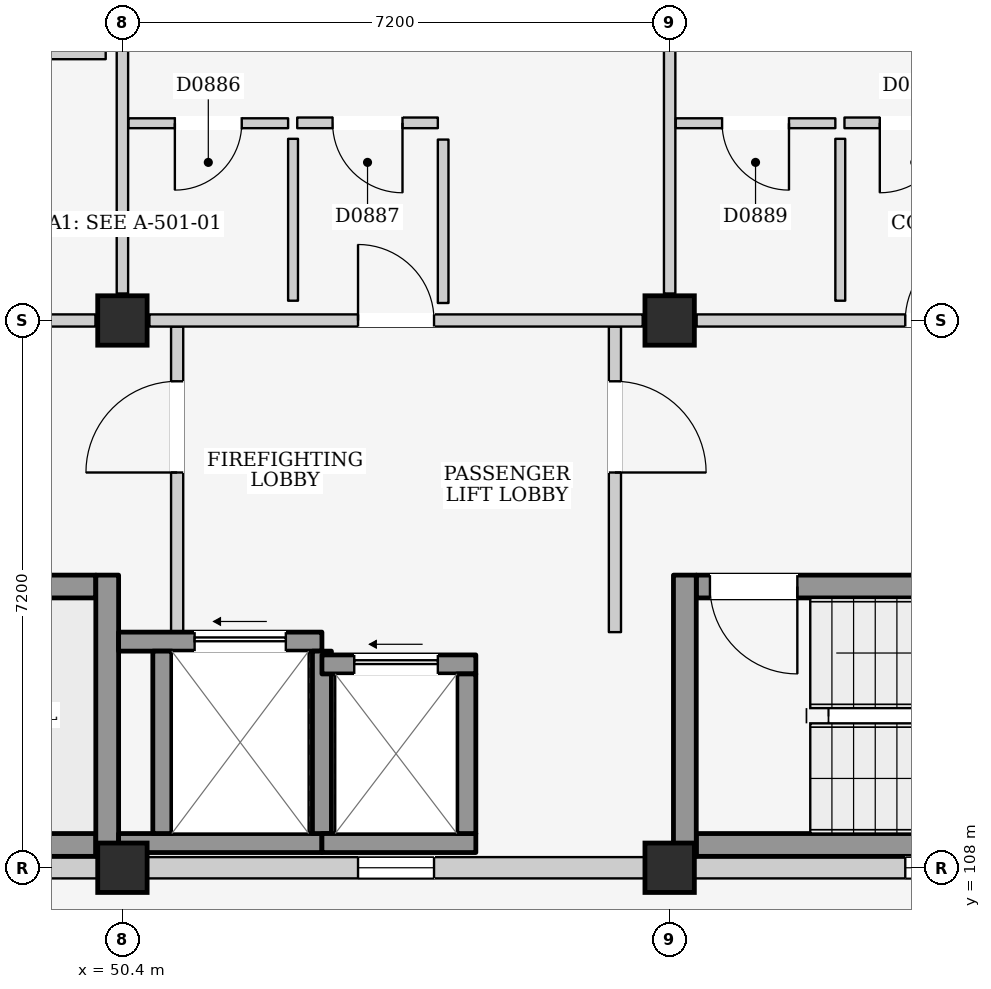
"""IFC4 building model, lengths in metres.
Left out: names, types, materials, properties, quantities, classifications, styles, units other than length and angle.
Written with IfcOpenShell. Run it as: python <this file> out.ifc"""

import sys

from ifc_helpers import new_model, si_unit, direction, frame, frame_2d, origin, origin_2d, place, context, subcontext, project, spatial, rectangle, extrude, element, fill, save


model = new_model("IFC4")
c1 = context("Model", 3, precision=1e-05, world=origin(), true_north=direction((0.0, 1.0)))
c2 = subcontext(c1, "Body", "Model", "MODEL_VIEW")
j1 = project(units=[si_unit("LENGTHUNIT", "METRE"), si_unit("PLANEANGLEUNIT", "RADIAN")], contexts=[c1])
p1 = place(None, origin())
s1 = spatial("IfcSite", under=j1, at=p1, CompositionType="ELEMENT")
p2 = place(p1, origin())
s2 = spatial("IfcBuilding", under=s1, at=p2, CompositionType="ELEMENT")
p3 = place(p2, frame((0.0, 0.0, 12.2)))
s3 = spatial("IfcBuildingStorey", under=s2, at=p3, CompositionType="ELEMENT", Elevation=12.2)
for number, where, z_axis, x_axis in (
    (1, (50.4, 108.0, 0.0), (0.0, 0.0, 1.0), (1.0, 0.0, 0.0)),
    (2, (50.4, 115.2, 0.0), (0.0, 0.0, 1.0), (1.0, 0.0, 0.0)),
    (3, (57.6, 108.0, 0.0), (0.0, 0.0, 1.0), (1.0, 0.0, 0.0)),
    (4, (57.6, 115.2, 0.0), (0.0, 0.0, 1.0), (1.0, 0.0, 0.0)),
):
    element("IfcColumn", number, at=place(p3, frame(where, z_axis=z_axis, x_axis=x_axis)), inside=s3, PredefinedType="COLUMN", context=c2, shape_type="SweptSolid", body=[
        extrude(rectangle(XDim=0.65, YDim=0.65, at=origin_2d()), origin(), (0.0, 0.0, 1.0), 3.2),
    ])
p4 = place(p3, frame((43.525, 108.0, 0.0), z_axis=(0.0, 0.0, 1.0), x_axis=(1.0, 0.0, 0.0)))
e5 = element("IfcWall", 5, at=p4, inside=s3, PredefinedType="ELEMENTEDWALL", context=c2, shape_type="SweptSolid", body=[
    extrude(rectangle(XDim=6.55, YDim=0.28, at=frame_2d((3.275, 0.0))), origin(), (0.0, 0.0, 1.0), 2.315),
])
p5 = place(p4, frame((2.775, 0.0, 1.2)))
e6 = element("IfcOpeningElement", 6, at=p5, cuts=e5, PredefinedType="OPENING", context=c2, shape_type="SweptSolid", body=[
    extrude(rectangle(XDim=1.0, YDim=0.9, at=frame_2d((0.5, 0.45))), frame((0.0, 0.155, 0.0), z_axis=(0.0, -1.0, 0.0), x_axis=(1.0, 0.0, 0.0)), (0.0, 0.0, 1.0), 0.31),
])
p6 = place(p3, frame((50.725, 108.0, 0.0), z_axis=(0.0, 0.0, 1.0), x_axis=(1.0, 0.0, 0.0)))
e7 = element("IfcWall", 7, at=p6, inside=s3, PredefinedType="ELEMENTEDWALL", context=c2, shape_type="SweptSolid", body=[
    extrude(rectangle(XDim=6.55, YDim=0.28, at=frame_2d((3.275, 0.0))), origin(), (0.0, 0.0, 1.0), 2.315),
])
p7 = place(p6, frame((2.775, 0.0, 1.2)))
e8 = element("IfcOpeningElement", 8, at=p7, cuts=e7, PredefinedType="OPENING", context=c2, shape_type="SweptSolid", body=[
    extrude(rectangle(XDim=1.0, YDim=0.9, at=frame_2d((0.5, 0.45))), frame((0.0, 0.155, 0.0), z_axis=(0.0, -1.0, 0.0), x_axis=(1.0, 0.0, 0.0)), (0.0, 0.0, 1.0), 0.31),
])
p8 = place(p3, frame((57.925, 108.0, 0.0), z_axis=(0.0, 0.0, 1.0), x_axis=(1.0, 0.0, 0.0)))
e9 = element("IfcWall", 9, at=p8, inside=s3, PredefinedType="ELEMENTEDWALL", context=c2, shape_type="SweptSolid", body=[
    extrude(rectangle(XDim=6.55, YDim=0.28, at=frame_2d((3.275, 0.0))), origin(), (0.0, 0.0, 1.0), 2.315),
])
p9 = place(p8, frame((2.775, 0.0, 1.2)))
e10 = element("IfcOpeningElement", 10, at=p9, cuts=e9, PredefinedType="OPENING", context=c2, shape_type="SweptSolid", body=[
    extrude(rectangle(XDim=1.0, YDim=0.9, at=frame_2d((0.5, 0.45))), frame((0.0, 0.155, 0.0), z_axis=(0.0, -1.0, 0.0), x_axis=(1.0, 0.0, 0.0)), (0.0, 0.0, 1.0), 0.31),
])
p10 = place(p3, frame((43.55, 108.3, 0.0), z_axis=(0.0, 0.0, 1.0), x_axis=(1.0, 0.0, 0.0)))
e11 = element("IfcWall", 11, at=p10, inside=s3, PredefinedType="SHEAR", context=c2, shape_type="SweptSolid", body=[
    extrude(rectangle(XDim=6.5, YDim=0.3, at=frame_2d((3.25, 0.0))), origin(), (0.0, 0.0, 1.0), 2.98),
])
p11 = place(p3, frame((43.55, 111.7, 0.0), z_axis=(0.0, 0.0, 1.0), x_axis=(1.0, 0.0, 0.0)))
e12 = element("IfcWall", 12, at=p11, inside=s3, PredefinedType="SHEAR", context=c2, shape_type="SweptSolid", body=[
    extrude(rectangle(XDim=6.5, YDim=0.3, at=frame_2d((3.25, 0.0))), origin(), (0.0, 0.0, 1.0), 2.98),
])
p12 = place(p11, frame((0.18, 0.0, 0.0)))
e13 = element("IfcOpeningElement", 13, at=p12, cuts=e12, PredefinedType="OPENING", context=c2, shape_type="SweptSolid", body=[
    extrude(rectangle(XDim=1.15, YDim=2.2, at=frame_2d((0.575, 1.1))), frame((0.0, 0.165, 0.0), z_axis=(0.0, -1.0, 0.0), x_axis=(1.0, 0.0, 0.0)), (0.0, 0.0, 1.0), 0.33),
])
p13 = place(p3, frame((50.2, 108.15, 0.0), z_axis=(0.0, 0.0, 1.0), x_axis=(0.0, 1.0, 0.0)))
e14 = element("IfcWall", 14, at=p13, inside=s3, PredefinedType="SHEAR", context=c2, shape_type="SweptSolid", body=[
    extrude(rectangle(XDim=3.7, YDim=0.3, at=frame_2d((1.85, 0.0))), origin(), (0.0, 0.0, 1.0), 2.98),
])
p14 = place(p3, frame((51.12, 111.1, 0.0), z_axis=(0.0, 0.0, 1.0), x_axis=(0.0, 1.0, 0.0)))
e15 = element("IfcWall", 15, at=p14, inside=s3, PredefinedType="PARTITIONING", context=c2, shape_type="SweptSolid", body=[
    extrude(rectangle(XDim=4.02, YDim=0.16, at=frame_2d((2.01, 0.0))), origin(), (0.0, 0.0, 1.0), 2.98),
])
p15 = place(p14, frame((2.1, 0.0, 0.0)))
e16 = element("IfcOpeningElement", 16, at=p15, cuts=e15, PredefinedType="OPENING", context=c2, shape_type="SweptSolid", body=[
    extrude(rectangle(XDim=1.2, YDim=2.2, at=frame_2d((0.6, 1.1))), frame((0.0, 0.095, 0.0), z_axis=(0.0, -1.0, 0.0), x_axis=(1.0, 0.0, 0.0)), (0.0, 0.0, 1.0), 0.19),
])
p16 = place(p3, frame((56.88, 111.1, 0.0), z_axis=(0.0, 0.0, 1.0), x_axis=(0.0, 1.0, 0.0)))
e17 = element("IfcWall", 17, at=p16, inside=s3, PredefinedType="PARTITIONING", context=c2, shape_type="SweptSolid", body=[
    extrude(rectangle(XDim=4.02, YDim=0.16, at=frame_2d((2.01, 0.0))), origin(), (0.0, 0.0, 1.0), 2.98),
])
p17 = place(p16, frame((2.1, 0.0, 0.0)))
e18 = element("IfcOpeningElement", 18, at=p17, cuts=e17, PredefinedType="OPENING", context=c2, shape_type="SweptSolid", body=[
    extrude(rectangle(XDim=1.2, YDim=2.2, at=frame_2d((0.6, 1.1))), frame((0.0, 0.095, 0.0), z_axis=(0.0, -1.0, 0.0), x_axis=(1.0, 0.0, 0.0)), (0.0, 0.0, 1.0), 0.19),
])
p18 = place(p3, frame((50.35, 108.325, 0.0), z_axis=(0.0, 0.0, 1.0), x_axis=(1.0, 0.0, 0.0)))
e19 = element("IfcWall", 19, at=p18, inside=s3, PredefinedType="SHEAR", context=c2, shape_type="SweptSolid", body=[
    extrude(rectangle(XDim=2.675, YDim=0.25, at=frame_2d((1.337, 0.0))), origin(), (0.0, 0.0, 1.0), 2.98),
])
p19 = place(p3, frame((50.35, 110.975, 0.0), z_axis=(0.0, 0.0, 1.0), x_axis=(1.0, 0.0, 0.0)))
e20 = element("IfcWall", 20, at=p19, inside=s3, PredefinedType="SHEAR", context=c2, shape_type="SweptSolid", body=[
    extrude(rectangle(XDim=2.675, YDim=0.25, at=frame_2d((1.337, 0.0))), origin(), (0.0, 0.0, 1.0), 2.98),
])
p20 = place(p19, frame((1.0, 0.0, 0.0)))
e21 = element("IfcOpeningElement", 21, at=p20, cuts=e20, PredefinedType="OPENING", context=c2, shape_type="SweptSolid", body=[
    extrude(rectangle(XDim=1.2, YDim=2.25, at=frame_2d((0.6, 1.125))), frame((0.0, 0.14, 0.0), z_axis=(0.0, -1.0, 0.0), x_axis=(1.0, 0.0, 0.0)), (0.0, 0.0, 1.0), 0.28),
])
for number, where, z_axis, x_axis in (
    (22, (50.925, 108.45, 0.0), (0.0, 0.0, 1.0), (0.0, 1.0, 0.0)),
    (23, (53.025, 108.45, 0.0), (0.0, 0.0, 1.0), (0.0, 1.0, 0.0)),
):
    element("IfcWall", number, at=place(p3, frame(where, z_axis=z_axis, x_axis=x_axis)), inside=s3, PredefinedType="SHEAR", context=c2, shape_type="SweptSolid", body=[
        extrude(rectangle(XDim=2.4, YDim=0.25, at=frame_2d((1.2, 0.0))), origin(), (0.0, 0.0, 1.0), 2.98),
    ])
p21 = place(p3, frame((53.025, 108.325, 0.0), z_axis=(0.0, 0.0, 1.0), x_axis=(1.0, 0.0, 0.0)))
e24 = element("IfcWall", 24, at=p21, inside=s3, PredefinedType="SHEAR", context=c2, shape_type="SweptSolid", body=[
    extrude(rectangle(XDim=2.025, YDim=0.25, at=frame_2d((1.013, 0.0))), origin(), (0.0, 0.0, 1.0), 2.98),
])
p22 = place(p3, frame((53.025, 110.675, 0.0), z_axis=(0.0, 0.0, 1.0), x_axis=(1.0, 0.0, 0.0)))
e25 = element("IfcWall", 25, at=p22, inside=s3, PredefinedType="SHEAR", context=c2, shape_type="SweptSolid", body=[
    extrude(rectangle(XDim=2.025, YDim=0.25, at=frame_2d((1.013, 0.0))), origin(), (0.0, 0.0, 1.0), 2.98),
])
p23 = place(p22, frame((0.425, 0.0, 0.0)))
e26 = element("IfcOpeningElement", 26, at=p23, cuts=e25, PredefinedType="OPENING", context=c2, shape_type="SweptSolid", body=[
    extrude(rectangle(XDim=1.1, YDim=2.15, at=frame_2d((0.55, 1.075))), frame((0.0, 0.14, 0.0), z_axis=(0.0, -1.0, 0.0), x_axis=(1.0, 0.0, 0.0)), (0.0, 0.0, 1.0), 0.28),
])
p24 = place(p3, frame((54.925, 108.45, 0.0), z_axis=(0.0, 0.0, 1.0), x_axis=(0.0, 1.0, 0.0)))
e27 = element("IfcWall", 27, at=p24, inside=s3, PredefinedType="SHEAR", context=c2, shape_type="SweptSolid", body=[
    extrude(rectangle(XDim=2.1, YDim=0.25, at=frame_2d((1.05, 0.0))), origin(), (0.0, 0.0, 1.0), 2.98),
])
p25 = place(p3, frame((57.95, 108.3, 0.0), z_axis=(0.0, 0.0, 1.0), x_axis=(1.0, 0.0, 0.0)))
e28 = element("IfcWall", 28, at=p25, inside=s3, PredefinedType="SHEAR", context=c2, shape_type="SweptSolid", body=[
    extrude(rectangle(XDim=6.5, YDim=0.3, at=frame_2d((3.25, 0.0))), origin(), (0.0, 0.0, 1.0), 2.98),
])
p26 = place(p3, frame((57.95, 111.7, 0.0), z_axis=(0.0, 0.0, 1.0), x_axis=(1.0, 0.0, 0.0)))
e29 = element("IfcWall", 29, at=p26, inside=s3, PredefinedType="SHEAR", context=c2, shape_type="SweptSolid", body=[
    extrude(rectangle(XDim=6.5, YDim=0.3, at=frame_2d((3.25, 0.0))), origin(), (0.0, 0.0, 1.0), 2.98),
])
p27 = place(p26, frame((0.18, 0.0, 0.0)))
e30 = element("IfcOpeningElement", 30, at=p27, cuts=e29, PredefinedType="OPENING", context=c2, shape_type="SweptSolid", body=[
    extrude(rectangle(XDim=1.15, YDim=2.2, at=frame_2d((0.575, 1.1))), frame((0.0, 0.165, 0.0), z_axis=(0.0, -1.0, 0.0), x_axis=(1.0, 0.0, 0.0)), (0.0, 0.0, 1.0), 0.33),
])
p28 = place(p3, frame((57.8, 108.15, 0.0), z_axis=(0.0, 0.0, 1.0), x_axis=(0.0, 1.0, 0.0)))
e31 = element("IfcWall", 31, at=p28, inside=s3, PredefinedType="SHEAR", context=c2, shape_type="SweptSolid", body=[
    extrude(rectangle(XDim=3.7, YDim=0.3, at=frame_2d((1.85, 0.0))), origin(), (0.0, 0.0, 1.0), 2.98),
])
p29 = place(p3, frame((43.555, 115.2, 0.0), z_axis=(0.0, 0.0, 1.0), x_axis=(1.0, 0.0, 0.0)))
e32 = element("IfcWall", 32, at=p29, inside=s3, PredefinedType="PARTITIONING", context=c2, shape_type="SweptSolid", body=[
    extrude(rectangle(XDim=6.49, YDim=0.16, at=frame_2d((3.245, 0.0))), origin(), (0.0, 0.0, 1.0), 2.315),
])
p30 = place(p3, frame((50.4, 115.555, 0.0), z_axis=(0.0, 0.0, 1.0), x_axis=(0.0, 1.0, 0.0)))
e33 = element("IfcWall", 33, at=p30, inside=s3, PredefinedType="PARTITIONING", context=c2, shape_type="SweptSolid", body=[
    extrude(rectangle(XDim=6.49, YDim=0.15, at=frame_2d((3.245, 0.0))), origin(), (0.0, 0.0, 1.0), 2.415),
])
p31 = place(p3, frame((47.12, 118.7, 0.0), z_axis=(0.0, 0.0, 1.0), x_axis=(1.0, 0.0, 0.0)))
e34 = element("IfcWall", 34, at=p31, inside=s3, PredefinedType="PARTITIONING", context=c2, shape_type="SweptSolid", body=[
    extrude(rectangle(XDim=3.06, YDim=0.125, at=frame_2d((1.53, 0.0))), origin(), (0.0, 0.0, 1.0), 2.98),
])
p32 = place(p3, frame((50.755, 115.2, 0.0), z_axis=(0.0, 0.0, 1.0), x_axis=(1.0, 0.0, 0.0)))
e35 = element("IfcWall", 35, at=p32, inside=s3, PredefinedType="PARTITIONING", context=c2, shape_type="SweptSolid", body=[
    extrude(rectangle(XDim=6.49, YDim=0.16, at=frame_2d((3.245, 0.0))), origin(), (0.0, 0.0, 1.0), 2.315),
])
p33 = place(p32, frame((2.745, 0.0, 0.0)))
e36 = element("IfcOpeningElement", 36, at=p33, cuts=e35, PredefinedType="OPENING", context=c2, shape_type="SweptSolid", body=[
    extrude(rectangle(XDim=1.0, YDim=2.15, at=frame_2d((0.5, 1.075))), frame((0.0, 0.095, 0.0), z_axis=(0.0, -1.0, 0.0), x_axis=(1.0, 0.0, 0.0)), (0.0, 0.0, 1.0), 0.19),
])
p34 = place(p3, frame((57.6, 115.555, 0.0), z_axis=(0.0, 0.0, 1.0), x_axis=(0.0, 1.0, 0.0)))
e37 = element("IfcWall", 37, at=p34, inside=s3, PredefinedType="PARTITIONING", context=c2, shape_type="SweptSolid", body=[
    extrude(rectangle(XDim=6.49, YDim=0.15, at=frame_2d((3.245, 0.0))), origin(), (0.0, 0.0, 1.0), 2.415),
])
p35 = place(p3, frame((50.48, 117.795, 0.0), z_axis=(0.0, 0.0, 1.0), x_axis=(1.0, 0.0, 0.0)))
e38 = element("IfcWall", 38, at=p35, inside=s3, PredefinedType="PARTITIONING", context=c2, shape_type="SweptSolid", body=[
    extrude(rectangle(XDim=2.1, YDim=0.13, at=frame_2d((1.05, 0.0))), origin(), (0.0, 0.0, 1.0), 2.98),
])
p36 = place(p35, frame((0.61, 0.0, 0.0)))
e39 = element("IfcOpeningElement", 39, at=p36, cuts=e38, PredefinedType="OPENING", context=c2, shape_type="SweptSolid", body=[
    extrude(rectangle(XDim=0.88, YDim=2.1, at=frame_2d((0.44, 1.05))), frame((0.0, 0.08, 0.0), z_axis=(0.0, -1.0, 0.0), x_axis=(1.0, 0.0, 0.0)), (0.0, 0.0, 1.0), 0.16),
])
p37 = place(p3, frame((52.645, 115.46, 0.0), z_axis=(0.0, 0.0, 1.0), x_axis=(0.0, 1.0, 0.0)))
e40 = element("IfcWall", 40, at=p37, inside=s3, PredefinedType="PARTITIONING", context=c2, shape_type="SweptSolid", body=[
    extrude(rectangle(XDim=2.13, YDim=0.13, at=frame_2d((1.065, 0.0))), origin(), (0.0, 0.0, 1.0), 2.98),
])
p38 = place(p3, frame((52.7, 117.8, 0.0), z_axis=(0.0, 0.0, 1.0), x_axis=(1.0, 0.0, 0.0)))
e41 = element("IfcWall", 41, at=p38, inside=s3, PredefinedType="PARTITIONING", context=c2, shape_type="SweptSolid", body=[
    extrude(rectangle(XDim=1.85, YDim=0.14, at=frame_2d((0.925, 0.0))), origin(), (0.0, 0.0, 1.0), 2.98),
])
p39 = place(p38, frame((0.465, 0.0, 0.0)))
e42 = element("IfcOpeningElement", 42, at=p39, cuts=e41, PredefinedType="OPENING", context=c2, shape_type="SweptSolid", body=[
    extrude(rectangle(XDim=0.92, YDim=2.1, at=frame_2d((0.46, 1.05))), frame((0.0, 0.085, 0.0), z_axis=(0.0, -1.0, 0.0), x_axis=(1.0, 0.0, 0.0)), (0.0, 0.0, 1.0), 0.17),
])
p40 = place(p3, frame((54.62, 115.43, 0.0), z_axis=(0.0, 0.0, 1.0), x_axis=(0.0, 1.0, 0.0)))
e43 = element("IfcWall", 43, at=p40, inside=s3, PredefinedType="PARTITIONING", context=c2, shape_type="SweptSolid", body=[
    extrude(rectangle(XDim=2.15, YDim=0.14, at=frame_2d((1.075, 0.0))), origin(), (0.0, 0.0, 1.0), 2.98),
])
p41 = place(p3, frame((57.955, 115.2, 0.0), z_axis=(0.0, 0.0, 1.0), x_axis=(1.0, 0.0, 0.0)))
e44 = element("IfcWall", 44, at=p41, inside=s3, PredefinedType="PARTITIONING", context=c2, shape_type="SweptSolid", body=[
    extrude(rectangle(XDim=6.49, YDim=0.16, at=frame_2d((3.245, 0.0))), origin(), (0.0, 0.0, 1.0), 2.315),
])
p42 = place(p41, frame((2.745, 0.0, 0.0)))
e45 = element("IfcOpeningElement", 45, at=p42, cuts=e44, PredefinedType="OPENING", context=c2, shape_type="SweptSolid", body=[
    extrude(rectangle(XDim=1.0, YDim=2.15, at=frame_2d((0.5, 1.075))), frame((0.0, 0.095, 0.0), z_axis=(0.0, -1.0, 0.0), x_axis=(1.0, 0.0, 0.0)), (0.0, 0.0, 1.0), 0.19),
])
p43 = place(p3, frame((57.68, 117.795, 0.0), z_axis=(0.0, 0.0, 1.0), x_axis=(1.0, 0.0, 0.0)))
e46 = element("IfcWall", 46, at=p43, inside=s3, PredefinedType="PARTITIONING", context=c2, shape_type="SweptSolid", body=[
    extrude(rectangle(XDim=2.1, YDim=0.13, at=frame_2d((1.05, 0.0))), origin(), (0.0, 0.0, 1.0), 2.98),
])
p44 = place(p43, frame((0.61, 0.0, 0.0)))
e47 = element("IfcOpeningElement", 47, at=p44, cuts=e46, PredefinedType="OPENING", context=c2, shape_type="SweptSolid", body=[
    extrude(rectangle(XDim=0.88, YDim=2.1, at=frame_2d((0.44, 1.05))), frame((0.0, 0.08, 0.0), z_axis=(0.0, -1.0, 0.0), x_axis=(1.0, 0.0, 0.0)), (0.0, 0.0, 1.0), 0.16),
])
p45 = place(p3, frame((59.845, 115.46, 0.0), z_axis=(0.0, 0.0, 1.0), x_axis=(0.0, 1.0, 0.0)))
e48 = element("IfcWall", 48, at=p45, inside=s3, PredefinedType="PARTITIONING", context=c2, shape_type="SweptSolid", body=[
    extrude(rectangle(XDim=2.13, YDim=0.13, at=frame_2d((1.065, 0.0))), origin(), (0.0, 0.0, 1.0), 2.98),
])
p46 = place(p3, frame((59.9, 117.8, 0.0), z_axis=(0.0, 0.0, 1.0), x_axis=(1.0, 0.0, 0.0)))
e49 = element("IfcWall", 49, at=p46, inside=s3, PredefinedType="PARTITIONING", context=c2, shape_type="SweptSolid", body=[
    extrude(rectangle(XDim=1.85, YDim=0.14, at=frame_2d((0.925, 0.0))), origin(), (0.0, 0.0, 1.0), 2.98),
])
p47 = place(p46, frame((0.465, 0.0, 0.0)))
e50 = element("IfcOpeningElement", 50, at=p47, cuts=e49, PredefinedType="OPENING", context=c2, shape_type="SweptSolid", body=[
    extrude(rectangle(XDim=0.92, YDim=2.1, at=frame_2d((0.46, 1.05))), frame((0.0, 0.085, 0.0), z_axis=(0.0, -1.0, 0.0), x_axis=(1.0, 0.0, 0.0)), (0.0, 0.0, 1.0), 0.17),
])
p48 = place(p7, origin())
e51 = element("IfcWindow", 51, at=p48, inside=s3, PartitioningType="SINGLE_PANEL", PredefinedType="WINDOW", context=c2, shape_type="SweptSolid", body=[
    extrude(rectangle(XDim=1.0, YDim=0.9, at=frame_2d((0.5, 0.45))), frame((0.0, 0.03, 0.0), z_axis=(0.0, -1.0, 0.0), x_axis=(1.0, 0.0, 0.0)), (0.0, 0.0, 1.0), 0.06),
])
fill(e8, e51)
p49 = place(p9, origin())
e52 = element("IfcWindow", 52, at=p49, inside=s3, PartitioningType="SINGLE_PANEL", PredefinedType="WINDOW", context=c2, shape_type="SweptSolid", body=[
    extrude(rectangle(XDim=1.0, YDim=0.9, at=frame_2d((0.5, 0.45))), frame((0.0, 0.03, 0.0), z_axis=(0.0, -1.0, 0.0), x_axis=(1.0, 0.0, 0.0)), (0.0, 0.0, 1.0), 0.06),
])
fill(e10, e52)
p50 = place(p15, origin())
e53 = element("IfcDoor", 53, at=p50, inside=s3, OperationType="SINGLE_SWING_LEFT", PredefinedType="DOOR", context=c2, shape_type="SweptSolid", body=[
    extrude(rectangle(XDim=1.2, YDim=2.2, at=frame_2d((0.6, 1.1))), frame((0.0, 0.025, 0.0), z_axis=(0.0, -1.0, 0.0), x_axis=(1.0, 0.0, 0.0)), (0.0, 0.0, 1.0), 0.05),
])
fill(e16, e53)
p51 = place(p17, frame((1.2, 0.0, 0.0), z_axis=(0.0, 0.0, 1.0), x_axis=(-1.0, 0.0, 0.0)))
e54 = element("IfcDoor", 54, at=p51, inside=s3, OperationType="SINGLE_SWING_RIGHT", PredefinedType="DOOR", context=c2, shape_type="SweptSolid", body=[
    extrude(rectangle(XDim=1.2, YDim=2.2, at=frame_2d((0.6, 1.1))), frame((0.0, 0.025, 0.0), z_axis=(0.0, -1.0, 0.0), x_axis=(1.0, 0.0, 0.0)), (0.0, 0.0, 1.0), 0.05),
])
fill(e18, e54)
p52 = place(p20, origin())
e55 = element("IfcDoor", 55, at=p52, inside=s3, OperationType="SLIDING_TO_LEFT", PredefinedType="DOOR", context=c2, shape_type="SweptSolid", body=[
    extrude(rectangle(XDim=1.2, YDim=2.25, at=frame_2d((0.6, 1.125))), frame((0.0, 0.025, 0.0), z_axis=(0.0, -1.0, 0.0), x_axis=(1.0, 0.0, 0.0)), (0.0, 0.0, 1.0), 0.05),
])
fill(e21, e55)
p53 = place(p23, origin())
e56 = element("IfcDoor", 56, at=p53, inside=s3, OperationType="SLIDING_TO_LEFT", PredefinedType="DOOR", context=c2, shape_type="SweptSolid", body=[
    extrude(rectangle(XDim=1.1, YDim=2.15, at=frame_2d((0.55, 1.075))), frame((0.0, 0.025, 0.0), z_axis=(0.0, -1.0, 0.0), x_axis=(1.0, 0.0, 0.0)), (0.0, 0.0, 1.0), 0.05),
])
fill(e26, e56)
p54 = place(p27, frame((1.15, 0.0, 0.0), z_axis=(0.0, 0.0, 1.0), x_axis=(-1.0, 0.0, 0.0)))
e57 = element("IfcDoor", 57, at=p54, inside=s3, OperationType="SINGLE_SWING_LEFT", PredefinedType="DOOR", context=c2, shape_type="SweptSolid", body=[
    extrude(rectangle(XDim=1.15, YDim=2.2, at=frame_2d((0.575, 1.1))), frame((0.0, 0.025, 0.0), z_axis=(0.0, -1.0, 0.0), x_axis=(1.0, 0.0, 0.0)), (0.0, 0.0, 1.0), 0.05),
])
fill(e30, e57)
p55 = place(p33, origin())
e58 = element("IfcDoor", 58, at=p55, inside=s3, OperationType="SINGLE_SWING_LEFT", PredefinedType="DOOR", context=c2, shape_type="SweptSolid", body=[
    extrude(rectangle(XDim=1.0, YDim=2.15, at=frame_2d((0.5, 1.075))), frame((0.0, 0.025, 0.0), z_axis=(0.0, -1.0, 0.0), x_axis=(1.0, 0.0, 0.0)), (0.0, 0.0, 1.0), 0.05),
])
fill(e36, e58)
p56 = place(p36, frame((0.88, 0.0, 0.0), z_axis=(0.0, 0.0, 1.0), x_axis=(-1.0, 0.0, 0.0)))
e59 = element("IfcDoor", 59, at=p56, inside=s3, OperationType="SINGLE_SWING_RIGHT", PredefinedType="DOOR", context=c2, shape_type="SweptSolid", body=[
    extrude(rectangle(XDim=0.88, YDim=2.1, at=frame_2d((0.44, 1.05))), frame((0.0, 0.025, 0.0), z_axis=(0.0, -1.0, 0.0), x_axis=(1.0, 0.0, 0.0)), (0.0, 0.0, 1.0), 0.05),
])
fill(e39, e59)
p57 = place(p39, frame((0.92, 0.0, 0.0), z_axis=(0.0, 0.0, 1.0), x_axis=(-1.0, 0.0, 0.0)))
e60 = element("IfcDoor", 60, at=p57, inside=s3, OperationType="SINGLE_SWING_LEFT", PredefinedType="DOOR", context=c2, shape_type="SweptSolid", body=[
    extrude(rectangle(XDim=0.92, YDim=2.1, at=frame_2d((0.46, 1.05))), frame((0.0, 0.025, 0.0), z_axis=(0.0, -1.0, 0.0), x_axis=(1.0, 0.0, 0.0)), (0.0, 0.0, 1.0), 0.05),
])
fill(e42, e60)
p58 = place(p42, origin())
e61 = element("IfcDoor", 61, at=p58, inside=s3, OperationType="SINGLE_SWING_RIGHT", PredefinedType="DOOR", context=c2, shape_type="SweptSolid", body=[
    extrude(rectangle(XDim=1.0, YDim=2.15, at=frame_2d((0.5, 1.075))), frame((0.0, 0.025, 0.0), z_axis=(0.0, -1.0, 0.0), x_axis=(1.0, 0.0, 0.0)), (0.0, 0.0, 1.0), 0.05),
])
fill(e45, e61)
p59 = place(p44, frame((0.88, 0.0, 0.0), z_axis=(0.0, 0.0, 1.0), x_axis=(-1.0, 0.0, 0.0)))
e62 = element("IfcDoor", 62, at=p59, inside=s3, OperationType="SINGLE_SWING_LEFT", PredefinedType="DOOR", context=c2, shape_type="SweptSolid", body=[
    extrude(rectangle(XDim=0.88, YDim=2.1, at=frame_2d((0.44, 1.05))), frame((0.0, 0.025, 0.0), z_axis=(0.0, -1.0, 0.0), x_axis=(1.0, 0.0, 0.0)), (0.0, 0.0, 1.0), 0.05),
])
fill(e47, e62)
p60 = place(p47, frame((0.92, 0.0, 0.0), z_axis=(0.0, 0.0, 1.0), x_axis=(-1.0, 0.0, 0.0)))
e63 = element("IfcDoor", 63, at=p60, inside=s3, OperationType="SINGLE_SWING_RIGHT", PredefinedType="DOOR", context=c2, shape_type="SweptSolid", body=[
    extrude(rectangle(XDim=0.92, YDim=2.1, at=frame_2d((0.46, 1.05))), frame((0.0, 0.025, 0.0), z_axis=(0.0, -1.0, 0.0), x_axis=(1.0, 0.0, 0.0)), (0.0, 0.0, 1.0), 0.05),
])
fill(e50, e63)
save(model, sys.argv[1])
